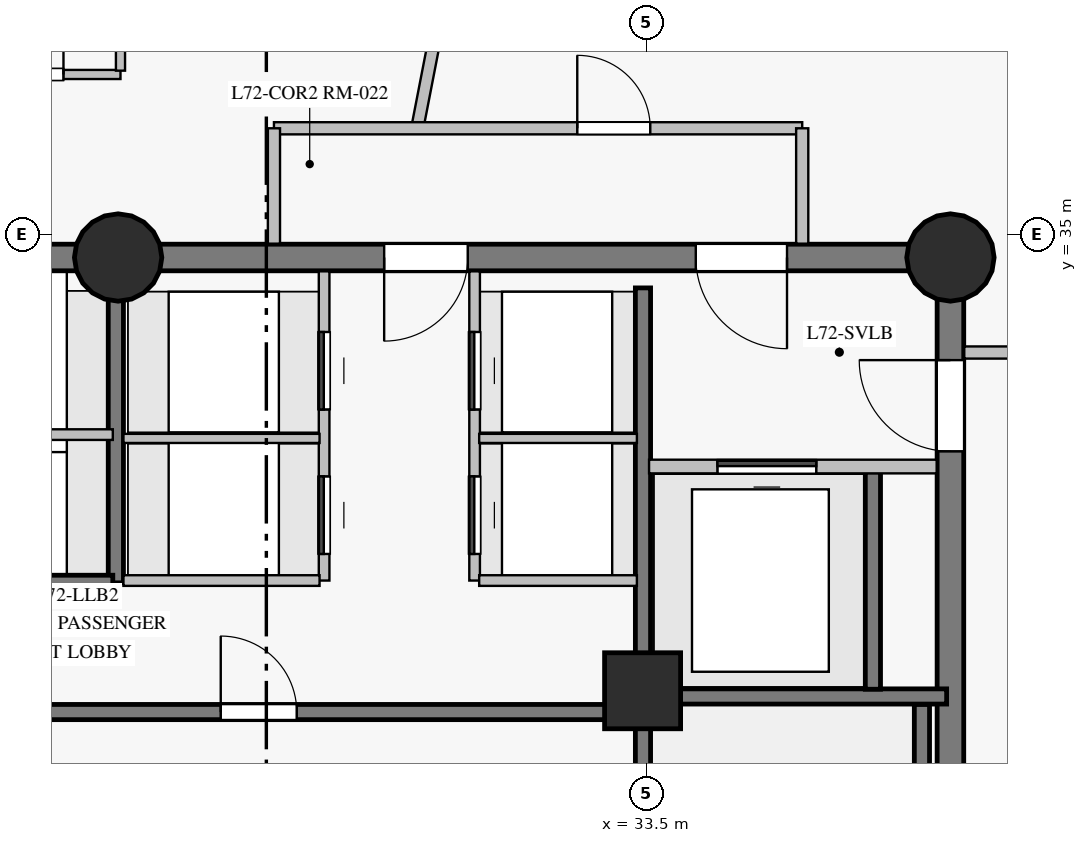
"""IFC4 building model, lengths in metres.
Left out: names, types, materials, properties, quantities, classifications, styles, units other than length and angle.
Written with IfcOpenShell. Run it as: python <this file> out.ifc"""

import sys

from ifc_helpers import new_model, si_unit, direction, frame, frame_2d, origin, origin_with_axes, origin_2d, place, context, subcontext, project, spatial, rectangle, circle, extrude, source, transform, mapped, element, fill, save


model = new_model("IFC4")
c1 = context("Model", 3, precision=1e-05, world=origin(), true_north=direction((0.0, 1.0)))
c2 = subcontext(c1, "Body", "Model", "MODEL_VIEW")
j1 = project(units=[si_unit("LENGTHUNIT", "METRE"), si_unit("PLANEANGLEUNIT", "RADIAN")], contexts=[c1])
p1 = place(None, origin())
s1 = spatial("IfcSite", under=j1, at=p1, CompositionType="ELEMENT")
p2 = place(p1, origin())
s2 = spatial("IfcBuilding", under=s1, at=p2, CompositionType="ELEMENT")
p3 = place(p2, frame((0.0, 0.0, 244.35)))
s3 = spatial("IfcBuildingStorey", under=s2, at=p3, CompositionType="ELEMENT", Elevation=244.35)
p4 = place(p3, frame((37.5, 18.3, 0.0), z_axis=(0.0, 0.0, 1.0), x_axis=(0.0, 1.0, 0.0)))
e1 = element("IfcWall", 1, at=p4, inside=s3, PredefinedType="SHEAR", context=c2, shape_type="SweptSolid", body=[
    extrude(rectangle(XDim=16.4, YDim=0.35, at=frame_2d((8.2, 0.0))), origin(), (0.0, 0.0, 1.0), 2.85),
])
p5 = place(p4, frame((13.85, 0.0, 0.0)))
e2 = element("IfcOpeningElement", 2, at=p5, cuts=e1, PredefinedType="OPENING", context=c2, shape_type="SweptSolid", body=[
    extrude(rectangle(XDim=1.2, YDim=2.15, at=frame_2d((0.6, 1.075))), frame((0.0, 0.185, 0.0), z_axis=(0.0, -1.0, 0.0), x_axis=(1.0, 0.0, 0.0)), (0.0, 0.0, 1.0), 0.37),
])
p6 = place(p3, frame((37.5, 34.7, 0.0), z_axis=(0.0, 0.0, 1.0), x_axis=(-1.0, 0.0, 0.0)))
e3 = element("IfcWall", 3, at=p6, inside=s3, PredefinedType="SHEAR", context=c2, shape_type="SweptSolid", body=[
    extrude(rectangle(XDim=10.95, YDim=0.35, at=frame_2d((5.475, 0.0))), origin(), (0.0, 0.0, 1.0), 2.85),
])
p7 = place(p6, frame((2.15, 0.0, 0.0)))
e4 = element("IfcOpeningElement", 4, at=p7, cuts=e3, PredefinedType="OPENING", context=c2, shape_type="SweptSolid", body=[
    extrude(rectangle(XDim=1.2, YDim=2.15, at=frame_2d((0.6, 1.075))), frame((0.0, 0.185, 0.0), z_axis=(0.0, -1.0, 0.0), x_axis=(1.0, 0.0, 0.0)), (0.0, 0.0, 1.0), 0.37),
])
p8 = place(p6, frame((6.35, 0.0, 0.0)))
e5 = element("IfcOpeningElement", 5, at=p8, cuts=e3, PredefinedType="OPENING", context=c2, shape_type="SweptSolid", body=[
    extrude(rectangle(XDim=1.1, YDim=2.15, at=frame_2d((0.55, 1.075))), frame((0.0, 0.185, 0.0), z_axis=(0.0, -1.0, 0.0), x_axis=(1.0, 0.0, 0.0)), (0.0, 0.0, 1.0), 0.37),
])
p9 = place(p3, frame((26.55, 34.7, 0.0), z_axis=(0.0, 0.0, 1.0), x_axis=(-1.0, 0.0, 0.0)))
e6 = element("IfcWall", 6, at=p9, inside=s3, PredefinedType="SHEAR", context=c2, shape_type="SweptSolid", body=[
    extrude(rectangle(XDim=7.05, YDim=0.35, at=frame_2d((3.525, 0.0))), origin(), (0.0, 0.0, 1.0), 2.85),
])
m1 = source(origin_with_axes(), c2, "Body", "SweptSolid", [
    extrude(circle(Radius=0.575, at=origin_2d()), origin(), (0.0, 0.0, 1.0), 3.05),
])
for number, where, z_axis, x_axis in (
    (7, (26.55, 34.7, 0.0), (0.0, 0.0, 1.0), (1.0, 0.0, 0.0)),
    (8, (37.5, 34.7, 0.0), (0.0, 0.0, 1.0), (1.0, 0.0, 0.0)),
):
    element("IfcColumn", number, at=place(p3, frame(where, z_axis=z_axis, x_axis=x_axis)), inside=s3, PredefinedType="COLUMN", context=c2, shape_type="MappedRepresentation", body=[
        mapped(m1, transform((0.0, 0.0, 0.0), scale=1.0)),
    ])
m2 = source(origin_with_axes(), c2, "Body", "SweptSolid", [
    extrude(rectangle(XDim=1.0, YDim=1.0, at=origin_2d()), origin(), (0.0, 0.0, 1.0), 3.05),
])
p10 = place(p3, frame((33.45, 29.0, 0.0), z_axis=(0.0, 0.0, 1.0), x_axis=(1.0, 0.0, 0.0)))
e9 = element("IfcColumn", 9, at=p10, inside=s3, PredefinedType="COLUMN", context=c2, shape_type="MappedRepresentation", body=[
    mapped(m2, transform((0.0, 0.0, 0.0), scale=1.0)),
])
p11 = place(p3, frame((43.037, 36.917, 0.0), z_axis=(0.0, 0.0, 1.0), x_axis=(-0.622204013182, 0.782855137289, 0.0)))
e10 = element("IfcWall", 10, at=p11, inside=s3, PredefinedType="SOLIDWALL", context=c2, shape_type="SweptSolid", body=[
    extrude(rectangle(XDim=11.381, YDim=0.28, at=frame_2d((5.69, 0.0))), origin(), (0.0, 0.0, 1.0), 2.85),
])
p12 = place(p11, frame((1.35, 0.0, 0.85)))
e11 = element("IfcOpeningElement", 11, at=p12, cuts=e10, PredefinedType="OPENING", context=c2, shape_type="SweptSolid", body=[
    extrude(rectangle(XDim=1.6, YDim=1.6, at=frame_2d((0.8, 0.8))), frame((0.0, 0.15, 0.0), z_axis=(0.0, -1.0, 0.0), x_axis=(1.0, 0.0, 0.0)), (0.0, 0.0, 1.0), 0.3),
])
p13 = place(p11, frame((4.89, 0.0, 0.85)))
e12 = element("IfcOpeningElement", 12, at=p13, cuts=e10, PredefinedType="OPENING", context=c2, shape_type="SweptSolid", body=[
    extrude(rectangle(XDim=1.6, YDim=1.6, at=frame_2d((0.8, 0.8))), frame((0.0, 0.15, 0.0), z_axis=(0.0, -1.0, 0.0), x_axis=(1.0, 0.0, 0.0)), (0.0, 0.0, 1.0), 0.3),
])
p14 = place(p11, frame((8.431, 0.0, 0.85)))
e13 = element("IfcOpeningElement", 13, at=p14, cuts=e10, PredefinedType="OPENING", context=c2, shape_type="SweptSolid", body=[
    extrude(rectangle(XDim=1.6, YDim=1.6, at=frame_2d((0.8, 0.8))), frame((0.0, 0.15, 0.0), z_axis=(0.0, -1.0, 0.0), x_axis=(1.0, 0.0, 0.0)), (0.0, 0.0, 1.0), 0.3),
])
p15 = place(p3, frame((33.455, 18.7, 0.0), z_axis=(0.0, 0.0, 1.0), x_axis=(0.0, 1.0, 0.0)))
e14 = element("IfcWall", 14, at=p15, inside=s3, PredefinedType="SHEAR", context=c2, shape_type="SweptSolid", body=[
    extrude(rectangle(XDim=15.6, YDim=0.2, at=frame_2d((7.8, 0.0))), origin(), (0.0, 0.0, 1.0), 2.85),
])
p16 = place(p15, frame((2.75, 0.0, 0.0)))
e15 = element("IfcOpeningElement", 15, at=p16, cuts=e14, PredefinedType="OPENING", context=c2, shape_type="SweptSolid", body=[
    extrude(rectangle(XDim=1.15, YDim=2.15, at=frame_2d((0.575, 1.075))), frame((0.0, 0.11, 0.0), z_axis=(0.0, -1.0, 0.0), x_axis=(1.0, 0.0, 0.0)), (0.0, 0.0, 1.0), 0.22),
])
p17 = place(p15, frame((0.55, 0.0, 0.0)))
e16 = element("IfcOpeningElement", 16, at=p17, cuts=e14, PredefinedType="OPENING", context=c2, shape_type="SweptSolid", body=[
    extrude(rectangle(XDim=0.94, YDim=2.1, at=frame_2d((0.47, 1.05))), frame((0.0, 0.11, 0.0), z_axis=(0.0, -1.0, 0.0), x_axis=(1.0, 0.0, 0.0)), (0.0, 0.0, 1.0), 0.22),
])
p18 = place(p3, frame((23.7, 28.72, 0.0), z_axis=(0.0, 0.0, 1.0), x_axis=(1.0, 0.0, 0.0)))
e17 = element("IfcWall", 17, at=p18, inside=s3, PredefinedType="SHEAR", context=c2, shape_type="SweptSolid", body=[
    extrude(rectangle(XDim=9.6, YDim=0.2, at=frame_2d((4.8, 0.0))), origin(), (0.0, 0.0, 1.0), 2.85),
])
p19 = place(p18, frame((4.2, 0.0, 0.0)))
e18 = element("IfcOpeningElement", 18, at=p19, cuts=e17, PredefinedType="OPENING", context=c2, shape_type="SweptSolid", body=[
    extrude(rectangle(XDim=1.0, YDim=2.15, at=frame_2d((0.5, 1.075))), frame((0.0, 0.11, 0.0), z_axis=(0.0, -1.0, 0.0), x_axis=(1.0, 0.0, 0.0)), (0.0, 0.0, 1.0), 0.22),
])
p20 = place(p3, frame((37.125, 21.32, 0.0), z_axis=(0.0, 0.0, 1.0), x_axis=(0.0, 1.0, 0.0)))
e19 = element("IfcWall", 19, at=p20, inside=s3, PredefinedType="SHEAR", context=c2, shape_type="SweptSolid", body=[
    extrude(rectangle(XDim=7.5, YDim=0.2, at=frame_2d((3.75, 0.0))), origin(), (0.0, 0.0, 1.0), 2.85),
])
p21 = place(p3, frame((33.455, 28.925, 0.0), z_axis=(0.0, 0.0, 1.0), x_axis=(1.0, 0.0, 0.0)))
e20 = element("IfcWall", 20, at=p21, inside=s3, PredefinedType="SHEAR", context=c2, shape_type="SweptSolid", body=[
    extrude(rectangle(XDim=3.995, YDim=0.2, at=frame_2d((1.998, 0.0))), origin(), (0.0, 0.0, 1.0), 2.85),
])
p22 = place(p3, frame((26.52, 30.42, 0.0), z_axis=(0.0, 0.0, 1.0), x_axis=(0.0, 1.0, 0.0)))
e21 = element("IfcWall", 21, at=p22, inside=s3, PredefinedType="SHEAR", context=c2, shape_type="SweptSolid", body=[
    extrude(rectangle(XDim=3.86, YDim=0.2, at=frame_2d((1.93, 0.0))), origin(), (0.0, 0.0, 1.0), 2.85),
])
p23 = place(p3, frame((36.48, 29.02, 0.0), z_axis=(0.0, 0.0, 1.0), x_axis=(0.0, 1.0, 0.0)))
e22 = element("IfcWall", 22, at=p23, inside=s3, PredefinedType="SHEAR", context=c2, shape_type="SweptSolid", body=[
    extrude(rectangle(XDim=2.86, YDim=0.2, at=frame_2d((1.43, 0.0))), origin(), (0.0, 0.0, 1.0), 2.85),
])
p24 = place(p3, frame((23.7, 30.42, 0.0), z_axis=(0.0, 0.0, 1.0), x_axis=(1.0, 0.0, 0.0)))
e23 = element("IfcWall", 23, at=p24, inside=s3, PredefinedType="SHEAR", context=c2, shape_type="SweptSolid", body=[
    extrude(rectangle(XDim=2.78, YDim=0.2, at=frame_2d((1.39, 0.0))), origin(), (0.0, 0.0, 1.0), 2.85),
])
p25 = place(p3, frame((30.48, 36.371, 0.0), z_axis=(0.0, 0.0, 1.0), x_axis=(0.19081586973, 0.981625847184, 0.0)))
e24 = element("IfcWall", 24, at=p25, inside=s3, PredefinedType="PARTITIONING", context=c2, shape_type="SweptSolid", body=[
    extrude(rectangle(XDim=9.962, YDim=0.16, at=frame_2d((4.981, 0.0))), origin(), (0.0, 0.0, 1.0), 2.85),
])
p26 = place(p3, frame((28.6, 36.4, 0.0), z_axis=(0.0, 0.0, 1.0), x_axis=(1.0, 0.0, 0.0)))
e25 = element("IfcWall", 25, at=p26, inside=s3, PredefinedType="PARTITIONING", context=c2, shape_type="SweptSolid", body=[
    extrude(rectangle(XDim=6.95, YDim=0.16, at=frame_2d((3.475, 0.0))), origin(), (0.0, 0.0, 1.0), 2.45),
])
p27 = place(p26, frame((3.99, 0.0, 0.0)))
e26 = element("IfcOpeningElement", 26, at=p27, cuts=e25, PredefinedType="OPENING", context=c2, shape_type="SweptSolid", body=[
    extrude(rectangle(XDim=0.96, YDim=2.15, at=frame_2d((0.48, 1.075))), frame((0.0, 0.09, 0.0), z_axis=(0.0, -1.0, 0.0), x_axis=(1.0, 0.0, 0.0)), (0.0, 0.0, 1.0), 0.18),
])
p28 = place(p3, frame((37.682, 33.45, 0.0), z_axis=(0.0, 0.0, 1.0), x_axis=(1.0, 0.0, 0.0)))
e27 = element("IfcWall", 27, at=p28, inside=s3, PredefinedType="PARTITIONING", context=c2, shape_type="SweptSolid", body=[
    extrude(rectangle(XDim=4.118, YDim=0.16, at=frame_2d((2.059, 0.0))), origin(), (0.0, 0.0, 1.0), 2.85),
])
p29 = place(p3, frame((29.26, 30.45, 0.0), z_axis=(0.0, 0.0, 1.0), x_axis=(0.0, 1.0, 0.0)))
e28 = element("IfcWall", 28, at=p29, inside=s3, PredefinedType="PARTITIONING", context=c2, shape_type="SweptSolid", body=[
    extrude(rectangle(XDim=4.068, YDim=0.14, at=frame_2d((2.034, 0.0))), origin(), (0.0, 0.0, 1.0), 2.85),
])
p30 = place(p29, frame((0.35, 0.0, 0.0)))
e29 = element("IfcOpeningElement", 29, at=p30, cuts=e28, PredefinedType="OPENING", context=c2, shape_type="SweptSolid", body=[
    extrude(rectangle(XDim=1.02, YDim=2.15, at=frame_2d((0.51, 1.075))), frame((0.0, 0.08, 0.0), z_axis=(0.0, -1.0, 0.0), x_axis=(1.0, 0.0, 0.0)), (0.0, 0.0, 1.0), 0.16),
])
p31 = place(p29, frame((2.25, 0.0, 0.0)))
e30 = element("IfcOpeningElement", 30, at=p31, cuts=e28, PredefinedType="OPENING", context=c2, shape_type="SweptSolid", body=[
    extrude(rectangle(XDim=1.02, YDim=2.15, at=frame_2d((0.51, 1.075))), frame((0.0, 0.08, 0.0), z_axis=(0.0, -1.0, 0.0), x_axis=(1.0, 0.0, 0.0)), (0.0, 0.0, 1.0), 0.16),
])
p32 = place(p3, frame((31.24, 30.45, 0.0), z_axis=(0.0, 0.0, 1.0), x_axis=(0.0, 1.0, 0.0)))
e31 = element("IfcWall", 31, at=p32, inside=s3, PredefinedType="PARTITIONING", context=c2, shape_type="SweptSolid", body=[
    extrude(rectangle(XDim=4.068, YDim=0.14, at=frame_2d((2.034, 0.0))), origin(), (0.0, 0.0, 1.0), 2.85),
])
p33 = place(p32, frame((0.35, 0.0, 0.0)))
e32 = element("IfcOpeningElement", 32, at=p33, cuts=e31, PredefinedType="OPENING", context=c2, shape_type="SweptSolid", body=[
    extrude(rectangle(XDim=1.02, YDim=2.15, at=frame_2d((0.51, 1.075))), frame((0.0, 0.08, 0.0), z_axis=(0.0, -1.0, 0.0), x_axis=(1.0, 0.0, 0.0)), (0.0, 0.0, 1.0), 0.16),
])
p34 = place(p32, frame((2.25, 0.0, 0.0)))
e33 = element("IfcOpeningElement", 33, at=p34, cuts=e31, PredefinedType="OPENING", context=c2, shape_type="SweptSolid", body=[
    extrude(rectangle(XDim=1.02, YDim=2.15, at=frame_2d((0.51, 1.075))), frame((0.0, 0.08, 0.0), z_axis=(0.0, -1.0, 0.0), x_axis=(1.0, 0.0, 0.0)), (0.0, 0.0, 1.0), 0.16),
])
p35 = place(p3, frame((33.535, 31.95, 0.0), z_axis=(0.0, 0.0, 1.0), x_axis=(1.0, 0.0, 0.0)))
e34 = element("IfcWall", 34, at=p35, inside=s3, PredefinedType="PARTITIONING", context=c2, shape_type="SweptSolid", body=[
    extrude(rectangle(XDim=3.784, YDim=0.18, at=frame_2d((1.892, 0.0))), origin(), (0.0, 0.0, 1.0), 2.85),
])
p36 = place(p35, frame((0.9, 0.0, 0.0)))
e35 = element("IfcOpeningElement", 35, at=p36, cuts=e34, PredefinedType="OPENING", context=c2, shape_type="SweptSolid", body=[
    extrude(rectangle(XDim=1.3, YDim=2.2, at=frame_2d((0.65, 1.1))), frame((0.0, 0.1, 0.0), z_axis=(0.0, -1.0, 0.0), x_axis=(1.0, 0.0, 0.0)), (0.0, 0.0, 1.0), 0.2),
])
p37 = place(p3, frame((23.652, 32.37, 0.0), z_axis=(0.0, 0.0, 1.0), x_axis=(1.0, 0.0, 0.0)))
e36 = element("IfcWall", 36, at=p37, inside=s3, PredefinedType="PARTITIONING", context=c2, shape_type="SweptSolid", body=[
    extrude(rectangle(XDim=2.828, YDim=0.14, at=frame_2d((1.414, 0.0))), origin(), (0.0, 0.0, 1.0), 2.85),
])
p38 = place(p3, frame((26.62, 30.45, 0.0), z_axis=(0.0, 0.0, 1.0), x_axis=(1.0, 0.0, 0.0)))
e37 = element("IfcWall", 37, at=p38, inside=s3, PredefinedType="PARTITIONING", context=c2, shape_type="SweptSolid", body=[
    extrude(rectangle(XDim=2.58, YDim=0.14, at=frame_2d((1.29, 0.0))), origin(), (0.0, 0.0, 1.0), 2.85),
])
p39 = place(p3, frame((26.62, 32.32, 0.0), z_axis=(0.0, 0.0, 1.0), x_axis=(1.0, 0.0, 0.0)))
e38 = element("IfcWall", 38, at=p39, inside=s3, PredefinedType="PARTITIONING", context=c2, shape_type="SweptSolid", body=[
    extrude(rectangle(XDim=2.58, YDim=0.12, at=frame_2d((1.29, 0.0))), origin(), (0.0, 0.0, 1.0), 2.85),
])
p40 = place(p3, frame((24.221, 37.108, 0.0), z_axis=(0.0, 0.0, 1.0), x_axis=(1.0, 0.0, 0.0)))
e39 = element("IfcWall", 39, at=p40, inside=s3, PredefinedType="PARTITIONING", context=c2, shape_type="SweptSolid", body=[
    extrude(rectangle(XDim=2.36, YDim=0.12, at=frame_2d((1.18, 0.0))), origin(), (0.0, 0.0, 1.0), 2.45),
])
p41 = place(p40, frame((0.75, 0.0, 0.0)))
e40 = element("IfcOpeningElement", 40, at=p41, cuts=e39, PredefinedType="OPENING", context=c2, shape_type="SweptSolid", body=[
    extrude(rectangle(XDim=0.86, YDim=2.1, at=frame_2d((0.43, 1.05))), frame((0.0, 0.07, 0.0), z_axis=(0.0, -1.0, 0.0), x_axis=(1.0, 0.0, 0.0)), (0.0, 0.0, 1.0), 0.14),
])
p42 = place(p3, frame((26.581, 37.158, 0.0), z_axis=(0.0, 0.0, 1.0), x_axis=(0.0, 1.0, 0.0)))
e41 = element("IfcWall", 41, at=p42, inside=s3, PredefinedType="PARTITIONING", context=c2, shape_type="SweptSolid", body=[
    extrude(rectangle(XDim=2.14, YDim=0.12, at=frame_2d((1.07, 0.0))), origin(), (0.0, 0.0, 1.0), 2.35),
])
p43 = place(p3, frame((31.3, 30.45, 0.0), z_axis=(0.0, 0.0, 1.0), x_axis=(1.0, 0.0, 0.0)))
e42 = element("IfcWall", 42, at=p43, inside=s3, PredefinedType="PARTITIONING", context=c2, shape_type="SweptSolid", body=[
    extrude(rectangle(XDim=2.075, YDim=0.14, at=frame_2d((1.038, 0.0))), origin(), (0.0, 0.0, 1.0), 2.85),
])
p44 = place(p3, frame((31.3, 32.32, 0.0), z_axis=(0.0, 0.0, 1.0), x_axis=(1.0, 0.0, 0.0)))
e43 = element("IfcWall", 43, at=p44, inside=s3, PredefinedType="PARTITIONING", context=c2, shape_type="SweptSolid", body=[
    extrude(rectangle(XDim=2.075, YDim=0.12, at=frame_2d((1.038, 0.0))), origin(), (0.0, 0.0, 1.0), 2.85),
])
for number, where, z_axis, x_axis in (
    (44, (28.6, 34.882, 0.0), (0.0, 0.0, 1.0), (0.0, 1.0, 0.0)),
    (45, (35.55, 36.4, 0.0), (0.0, 0.0, 1.0), (0.0, -1.0, 0.0)),
):
    element("IfcWall", number, at=place(p3, frame(where, z_axis=z_axis, x_axis=x_axis)), inside=s3, PredefinedType="PARTITIONING", context=c2, shape_type="SweptSolid", body=[
        extrude(rectangle(XDim=1.518, YDim=0.16, at=frame_2d((0.759, 0.0))), origin(), (0.0, 0.0, 1.0), 2.85),
    ])
m3 = source(origin_with_axes(), c2, "Body", "SweptSolid", [
    extrude(rectangle(XDim=1.2, YDim=2.15, at=frame_2d((0.6, 1.075))), frame((0.0, 0.025, 0.0), z_axis=(0.0, -1.0, 0.0), x_axis=(1.0, 0.0, 0.0)), (0.0, 0.0, 1.0), 0.05),
])
p45 = place(p5, origin())
e46 = element("IfcDoor", 46, at=p45, inside=s3, OperationType="SINGLE_SWING_RIGHT", PredefinedType="DOOR", context=c2, shape_type="MappedRepresentation", body=[
    mapped(m3, transform((0.0, 0.0, 0.0), scale=1.0)),
])
fill(e2, e46)
p46 = place(p7, origin())
e47 = element("IfcDoor", 47, at=p46, inside=s3, OperationType="SINGLE_SWING_LEFT", PredefinedType="DOOR", context=c2, shape_type="MappedRepresentation", body=[
    mapped(m3, transform((0.0, 0.0, 0.0), scale=1.0)),
])
fill(e4, e47)
m4 = source(origin_with_axes(), c2, "Body", "SweptSolid", [
    extrude(rectangle(XDim=1.3, YDim=2.2, at=frame_2d((0.65, 1.1))), frame((0.0, 0.025, 0.0), z_axis=(0.0, -1.0, 0.0), x_axis=(1.0, 0.0, 0.0)), (0.0, 0.0, 1.0), 0.05),
])
p47 = place(p36, origin())
e48 = element("IfcDoor", 48, at=p47, inside=s3, OperationType="SLIDING_TO_LEFT", PredefinedType="DOOR", context=c2, shape_type="MappedRepresentation", body=[
    mapped(m4, transform((0.0, 0.0, 0.0), scale=1.0)),
])
fill(e35, e48)
m5 = source(origin_with_axes(), c2, "Body", "SweptSolid", [
    extrude(rectangle(XDim=1.0, YDim=2.15, at=frame_2d((0.5, 1.075))), frame((0.0, 0.025, 0.0), z_axis=(0.0, -1.0, 0.0), x_axis=(1.0, 0.0, 0.0)), (0.0, 0.0, 1.0), 0.05),
])
p48 = place(p19, origin())
e49 = element("IfcDoor", 49, at=p48, inside=s3, OperationType="SINGLE_SWING_LEFT", PredefinedType="DOOR", context=c2, shape_type="MappedRepresentation", body=[
    mapped(m5, transform((0.0, 0.0, 0.0), scale=1.0)),
])
fill(e18, e49)
m6 = source(origin_with_axes(), c2, "Body", "SweptSolid", [
    extrude(rectangle(XDim=1.1, YDim=2.15, at=frame_2d((0.55, 1.075))), frame((0.0, 0.025, 0.0), z_axis=(0.0, -1.0, 0.0), x_axis=(1.0, 0.0, 0.0)), (0.0, 0.0, 1.0), 0.05),
])
p49 = place(p8, origin())
e50 = element("IfcDoor", 50, at=p49, inside=s3, OperationType="SINGLE_SWING_RIGHT", PredefinedType="DOOR", context=c2, shape_type="MappedRepresentation", body=[
    mapped(m6, transform((0.0, 0.0, 0.0), scale=1.0)),
])
fill(e5, e50)
m7 = source(origin_with_axes(), c2, "Body", "SweptSolid", [
    extrude(rectangle(XDim=1.02, YDim=2.15, at=frame_2d((0.51, 1.075))), frame((0.0, 0.025, 0.0), z_axis=(0.0, -1.0, 0.0), x_axis=(1.0, 0.0, 0.0)), (0.0, 0.0, 1.0), 0.05),
])
p50 = place(p30, origin())
e51 = element("IfcDoor", 51, at=p50, inside=s3, OperationType="SLIDING_TO_LEFT", PredefinedType="DOOR", context=c2, shape_type="MappedRepresentation", body=[
    mapped(m7, transform((0.0, 0.0, 0.0), scale=1.0)),
])
fill(e29, e51)
p51 = place(p31, origin())
e52 = element("IfcDoor", 52, at=p51, inside=s3, OperationType="SLIDING_TO_LEFT", PredefinedType="DOOR", context=c2, shape_type="MappedRepresentation", body=[
    mapped(m7, transform((0.0, 0.0, 0.0), scale=1.0)),
])
fill(e30, e52)
p52 = place(p33, origin())
e53 = element("IfcDoor", 53, at=p52, inside=s3, OperationType="SLIDING_TO_LEFT", PredefinedType="DOOR", context=c2, shape_type="MappedRepresentation", body=[
    mapped(m7, transform((0.0, 0.0, 0.0), scale=1.0)),
])
fill(e32, e53)
p53 = place(p34, origin())
e54 = element("IfcDoor", 54, at=p53, inside=s3, OperationType="SLIDING_TO_LEFT", PredefinedType="DOOR", context=c2, shape_type="MappedRepresentation", body=[
    mapped(m7, transform((0.0, 0.0, 0.0), scale=1.0)),
])
fill(e33, e54)
m8 = source(origin_with_axes(), c2, "Body", "SweptSolid", [
    extrude(rectangle(XDim=0.96, YDim=2.15, at=frame_2d((0.48, 1.075))), frame((0.0, 0.025, 0.0), z_axis=(0.0, -1.0, 0.0), x_axis=(1.0, 0.0, 0.0)), (0.0, 0.0, 1.0), 0.05),
])
p54 = place(p27, origin())
e55 = element("IfcDoor", 55, at=p54, inside=s3, OperationType="SINGLE_SWING_LEFT", PredefinedType="DOOR", context=c2, shape_type="MappedRepresentation", body=[
    mapped(m8, transform((0.0, 0.0, 0.0), scale=1.0)),
])
fill(e26, e55)
m9 = source(origin_with_axes(), c2, "Body", "SweptSolid", [
    extrude(rectangle(XDim=0.86, YDim=2.1, at=frame_2d((0.43, 1.05))), frame((0.0, 0.025, 0.0), z_axis=(0.0, -1.0, 0.0), x_axis=(1.0, 0.0, 0.0)), (0.0, 0.0, 1.0), 0.05),
])
p55 = place(p41, origin())
e56 = element("IfcDoor", 56, at=p55, inside=s3, OperationType="SINGLE_SWING_RIGHT", PredefinedType="DOOR", context=c2, shape_type="MappedRepresentation", body=[
    mapped(m9, transform((0.0, 0.0, 0.0), scale=1.0)),
])
fill(e40, e56)
save(model, sys.argv[1])
